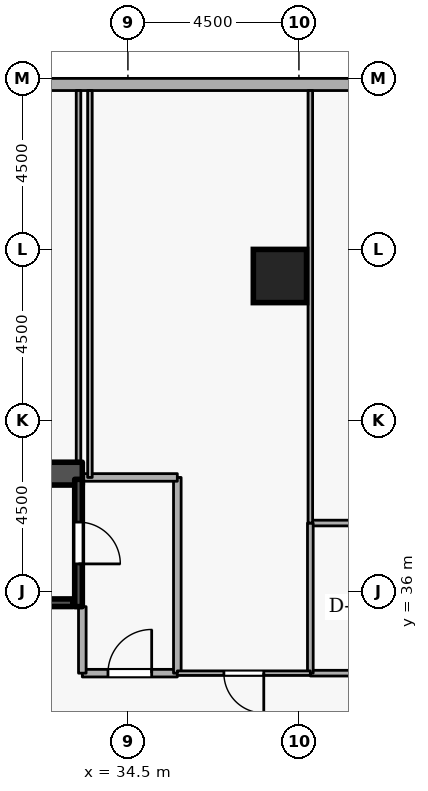
"""IFC4 building model, lengths in metres.
Left out: names, types, materials, properties, quantities, classifications, styles, units other than length and angle.
Written with IfcOpenShell. Run it as: python <this file> out.ifc"""

import sys

from ifc_helpers import new_model, si_unit, direction, frame, frame_2d, origin, origin_2d, place, context, subcontext, project, spatial, rectangle, extrude, element, fill, save


model = new_model("IFC4")
c1 = context("Model", 3, precision=1e-05, world=origin(), true_north=direction((0.0, 1.0)))
c2 = subcontext(c1, "Body", "Model", "MODEL_VIEW")
j1 = project(units=[si_unit("LENGTHUNIT", "METRE"), si_unit("PLANEANGLEUNIT", "RADIAN")], contexts=[c1])
p1 = place(None, origin())
s1 = spatial("IfcSite", under=j1, at=p1, CompositionType="ELEMENT")
p2 = place(p1, origin())
s2 = spatial("IfcBuilding", under=s1, at=p2, CompositionType="ELEMENT")
p3 = place(p2, frame((0.0, 0.0, 23.1)))
s3 = spatial("IfcBuildingStorey", under=s2, at=p3, CompositionType="ELEMENT", Elevation=23.1)
p4 = place(p3, frame((17.7, 39.1, 0.0), z_axis=(0.0, 0.0, 1.0), x_axis=(1.0, 0.0, 0.0)))
e1 = element("IfcWall", 1, at=p4, inside=s3, PredefinedType="SHEAR", context=c2, shape_type="SweptSolid", body=[
    extrude(rectangle(XDim=15.6, YDim=0.6, at=frame_2d((7.8, 0.0))), origin(), (0.0, 0.0, 1.0), 4.8),
])
p5 = place(p3, frame((38.5, 44.3, 0.0), z_axis=(0.0, 0.0, 1.0), x_axis=(1.0, 0.0, 0.0)))
e2 = element("IfcColumn", 2, at=p5, inside=s3, PredefinedType="COLUMN", context=c2, shape_type="SweptSolid", body=[
    extrude(rectangle(XDim=1.4, YDim=1.4, at=origin_2d()), origin(), (0.0, 0.0, 1.0), 4.8),
])
p6 = place(p3, frame((42.4, 49.34, 0.0), z_axis=(0.0, 0.0, 1.0), x_axis=(-1.0, 0.0, 0.0)))
e3 = element("IfcWall", 3, at=p6, inside=s3, PredefinedType="STANDARD", context=c2, shape_type="SweptSolid", body=[
    extrude(rectangle(XDim=39.4, YDim=0.32, at=frame_2d((19.7, 0.0))), origin(), (0.0, 0.0, 1.0), 2.84),
])
p7 = place(p6, frame((12.8, 0.0, 0.65)))
e4 = element("IfcOpeningElement", 4, at=p7, cuts=e3, PredefinedType="OPENING", context=c2, shape_type="SweptSolid", body=[
    extrude(rectangle(XDim=1.8, YDim=1.25, at=frame_2d((0.9, 0.625))), frame((0.0, 0.17, 0.0), z_axis=(0.0, -1.0, 0.0), x_axis=(1.0, 0.0, 0.0)), (0.0, 0.0, 1.0), 0.34),
])
p8 = place(p6, frame((22.8, 0.0, 0.65)))
e5 = element("IfcOpeningElement", 5, at=p8, cuts=e3, PredefinedType="OPENING", context=c2, shape_type="SweptSolid", body=[
    extrude(rectangle(XDim=1.8, YDim=1.25, at=frame_2d((0.9, 0.625))), frame((0.0, 0.17, 0.0), z_axis=(0.0, -1.0, 0.0), x_axis=(1.0, 0.0, 0.0)), (0.0, 0.0, 1.0), 0.34),
])
p9 = place(p3, frame((33.2, 38.95, 0.0), z_axis=(0.0, 0.0, 1.0), x_axis=(0.0, -1.0, 0.0)))
e6 = element("IfcWall", 6, at=p9, inside=s3, PredefinedType="SHEAR", context=c2, shape_type="SweptSolid", body=[
    extrude(rectangle(XDim=3.35, YDim=0.2, at=frame_2d((1.675, 0.0))), origin(), (0.0, 0.0, 1.0), 4.8),
])
p10 = place(p9, frame((1.125, 0.0, 0.0)))
e7 = element("IfcOpeningElement", 7, at=p10, cuts=e6, PredefinedType="OPENING", context=c2, shape_type="SweptSolid", body=[
    extrude(rectangle(XDim=1.1, YDim=2.1, at=frame_2d((0.55, 1.05))), frame((0.0, 0.11, 0.0), z_axis=(0.0, -1.0, 0.0), x_axis=(1.0, 0.0, 0.0)), (0.0, 0.0, 1.0), 0.22),
])
p11 = place(p3, frame((25.95, 35.703, 0.0), z_axis=(0.0, 0.0, 1.0), x_axis=(1.0, 0.0, 0.0)))
e8 = element("IfcWall", 8, at=p11, inside=s3, PredefinedType="SHEAR", context=c2, shape_type="SweptSolid", body=[
    extrude(rectangle(XDim=7.1, YDim=0.2, at=frame_2d((3.55, 0.0))), origin(), (0.0, 0.0, 1.0), 4.8),
])
p12 = place(p3, frame((33.3, 33.85, 0.0), z_axis=(0.0, 0.0, 1.0), x_axis=(1.0, 0.0, 0.0)))
e9 = element("IfcWall", 9, at=p12, inside=s3, PredefinedType="STANDARD", context=c2, shape_type="SweptSolid", body=[
    extrude(rectangle(XDim=2.5, YDim=0.2, at=frame_2d((1.25, 0.0))), origin(), (0.0, 0.0, 1.0), 4.54),
])
p13 = place(p12, frame((0.675, 0.0, 0.0)))
e10 = element("IfcOpeningElement", 10, at=p13, cuts=e9, PredefinedType="OPENING", context=c2, shape_type="SweptSolid", body=[
    extrude(rectangle(XDim=1.15, YDim=2.1, at=frame_2d((0.575, 1.05))), frame((0.0, 0.11, 0.0), z_axis=(0.0, -1.0, 0.0), x_axis=(1.0, 0.0, 0.0)), (0.0, 0.0, 1.0), 0.22),
])
p14 = place(p3, frame((35.8, 33.85, 0.0), z_axis=(0.0, 0.0, 1.0), x_axis=(0.0, 1.0, 0.0)))
e11 = element("IfcWall", 11, at=p14, inside=s3, PredefinedType="STANDARD", context=c2, shape_type="SweptSolid", body=[
    extrude(rectangle(XDim=5.15, YDim=0.2, at=frame_2d((2.575, 0.0))), origin(), (0.0, 0.0, 1.0), 4.54),
])
p15 = place(p3, frame((35.8, 39.0, 0.0), z_axis=(0.0, 0.0, 1.0), x_axis=(-1.0, 0.0, 0.0)))
e12 = element("IfcWall", 12, at=p15, inside=s3, PredefinedType="STANDARD", context=c2, shape_type="SweptSolid", body=[
    extrude(rectangle(XDim=2.5, YDim=0.2, at=frame_2d((1.25, 0.0))), origin(), (0.0, 0.0, 1.0), 4.54),
])
p16 = place(p3, frame((33.3, 35.6, 0.0), z_axis=(0.0, 0.0, 1.0), x_axis=(0.0, -1.0, 0.0)))
e13 = element("IfcWall", 13, at=p16, inside=s3, PredefinedType="STANDARD", context=c2, shape_type="SweptSolid", body=[
    extrude(rectangle(XDim=1.75, YDim=0.2, at=frame_2d((0.875, 0.0))), origin(), (0.0, 0.0, 1.0), 3.745),
])
p17 = place(p3, frame((39.3, 33.85, 0.0), z_axis=(0.0, 0.0, 1.0), x_axis=(1.0, 0.0, 0.0)))
e14 = element("IfcWall", 14, at=p17, inside=s3, PredefinedType="PARTITIONING", context=c2, shape_type="SweptSolid", body=[
    extrude(rectangle(XDim=4.0, YDim=0.15, at=frame_2d((2.0, 0.0))), origin(), (0.0, 0.0, 1.0), 4.54),
])
p18 = place(p17, frame((1.54, 0.0, 0.0)))
e15 = element("IfcOpeningElement", 15, at=p18, cuts=e14, PredefinedType="OPENING", context=c2, shape_type="SweptSolid", body=[
    extrude(rectangle(XDim=0.92, YDim=2.08, at=frame_2d((0.46, 1.04))), frame((0.0, 0.085, 0.0), z_axis=(0.0, -1.0, 0.0), x_axis=(1.0, 0.0, 0.0)), (0.0, 0.0, 1.0), 0.17),
])
p19 = place(p3, frame((43.3, 37.8, 0.0), z_axis=(0.0, 0.0, 1.0), x_axis=(-1.0, 0.0, 0.0)))
e16 = element("IfcWall", 16, at=p19, inside=s3, PredefinedType="PARTITIONING", context=c2, shape_type="SweptSolid", body=[
    extrude(rectangle(XDim=4.0, YDim=0.15, at=frame_2d((2.0, 0.0))), origin(), (0.0, 0.0, 1.0), 4.54),
])
p20 = place(p3, frame((39.3, 37.8, 0.0), z_axis=(0.0, 0.0, 1.0), x_axis=(0.0, -1.0, 0.0)))
e17 = element("IfcWall", 17, at=p20, inside=s3, PredefinedType="PARTITIONING", context=c2, shape_type="SweptSolid", body=[
    extrude(rectangle(XDim=3.95, YDim=0.15, at=frame_2d((1.975, 0.0))), origin(), (0.0, 0.0, 1.0), 4.54),
])
p21 = place(p3, frame((39.3, 49.18, 0.0), z_axis=(0.0, 0.0, 1.0), x_axis=(0.0, -1.0, 0.0)))
e18 = element("IfcWall", 18, at=p21, inside=s3, PredefinedType="PARTITIONING", context=c2, shape_type="SweptSolid", body=[
    extrude(rectangle(XDim=11.38, YDim=0.12, at=frame_2d((5.69, 0.0))), origin(), (0.0, 0.0, 1.0), 4.54),
])
p22 = place(p3, frame((39.3, 33.85, 0.0), z_axis=(0.0, 0.0, 1.0), x_axis=(-1.0, 0.0, 0.0)))
e19 = element("IfcWall", 19, at=p22, inside=s3, PredefinedType="PARTITIONING", context=c2, shape_type="SweptSolid", body=[
    extrude(rectangle(XDim=3.5, YDim=0.12, at=frame_2d((1.75, 0.0))), origin(), (0.0, 0.0, 1.0), 4.54),
])
p23 = place(p22, frame((1.225, 0.0, 0.0)))
e20 = element("IfcOpeningElement", 20, at=p23, cuts=e19, PredefinedType="OPENING", context=c2, shape_type="SweptSolid", body=[
    extrude(rectangle(XDim=1.05, YDim=2.1, at=frame_2d((0.525, 1.05))), frame((0.0, 0.07, 0.0), z_axis=(0.0, -1.0, 0.0), x_axis=(1.0, 0.0, 0.0)), (0.0, 0.0, 1.0), 0.14),
])
p24 = place(p3, frame((33.5, 39.0, 0.0), z_axis=(0.0, 0.0, 1.0), x_axis=(0.0, 1.0, 0.0)))
e21 = element("IfcWall", 21, at=p24, inside=s3, PredefinedType="PARTITIONING", context=c2, shape_type="SweptSolid", body=[
    extrude(rectangle(XDim=10.18, YDim=0.12, at=frame_2d((5.09, 0.0))), origin(), (0.0, 0.0, 1.0), 4.54),
])
p25 = place(p3, frame((33.2, 49.18, 0.0), z_axis=(0.0, 0.0, 1.0), x_axis=(0.0, -1.0, 0.0)))
e22 = element("IfcWall", 22, at=p25, inside=s3, PredefinedType="PARTITIONING", context=c2, shape_type="SweptSolid", body=[
    extrude(rectangle(XDim=9.98, YDim=0.12, at=frame_2d((4.99, 0.0))), origin(), (0.0, 0.0, 1.0), 4.54),
])
p26 = place(p10, origin())
e23 = element("IfcDoor", 23, at=p26, inside=s3, OperationType="SINGLE_SWING_RIGHT", PredefinedType="DOOR", context=c2, shape_type="SweptSolid", body=[
    extrude(rectangle(XDim=1.1, YDim=2.1, at=frame_2d((0.55, 1.05))), frame((0.0, 0.025, 0.0), z_axis=(0.0, -1.0, 0.0), x_axis=(1.0, 0.0, 0.0)), (0.0, 0.0, 1.0), 0.05),
])
fill(e7, e23)
p27 = place(p13, origin())
e24 = element("IfcDoor", 24, at=p27, inside=s3, OperationType="SINGLE_SWING_RIGHT", PredefinedType="DOOR", context=c2, shape_type="SweptSolid", body=[
    extrude(rectangle(XDim=1.15, YDim=2.1, at=frame_2d((0.575, 1.05))), frame((0.0, 0.025, 0.0), z_axis=(0.0, -1.0, 0.0), x_axis=(1.0, 0.0, 0.0)), (0.0, 0.0, 1.0), 0.05),
])
fill(e10, e24)
p28 = place(p23, origin())
e25 = element("IfcDoor", 25, at=p28, inside=s3, OperationType="SINGLE_SWING_LEFT", PredefinedType="DOOR", context=c2, shape_type="SweptSolid", body=[
    extrude(rectangle(XDim=1.05, YDim=2.1, at=frame_2d((0.525, 1.05))), frame((0.0, 0.025, 0.0), z_axis=(0.0, -1.0, 0.0), x_axis=(1.0, 0.0, 0.0)), (0.0, 0.0, 1.0), 0.05),
])
fill(e20, e25)
save(model, sys.argv[1])
